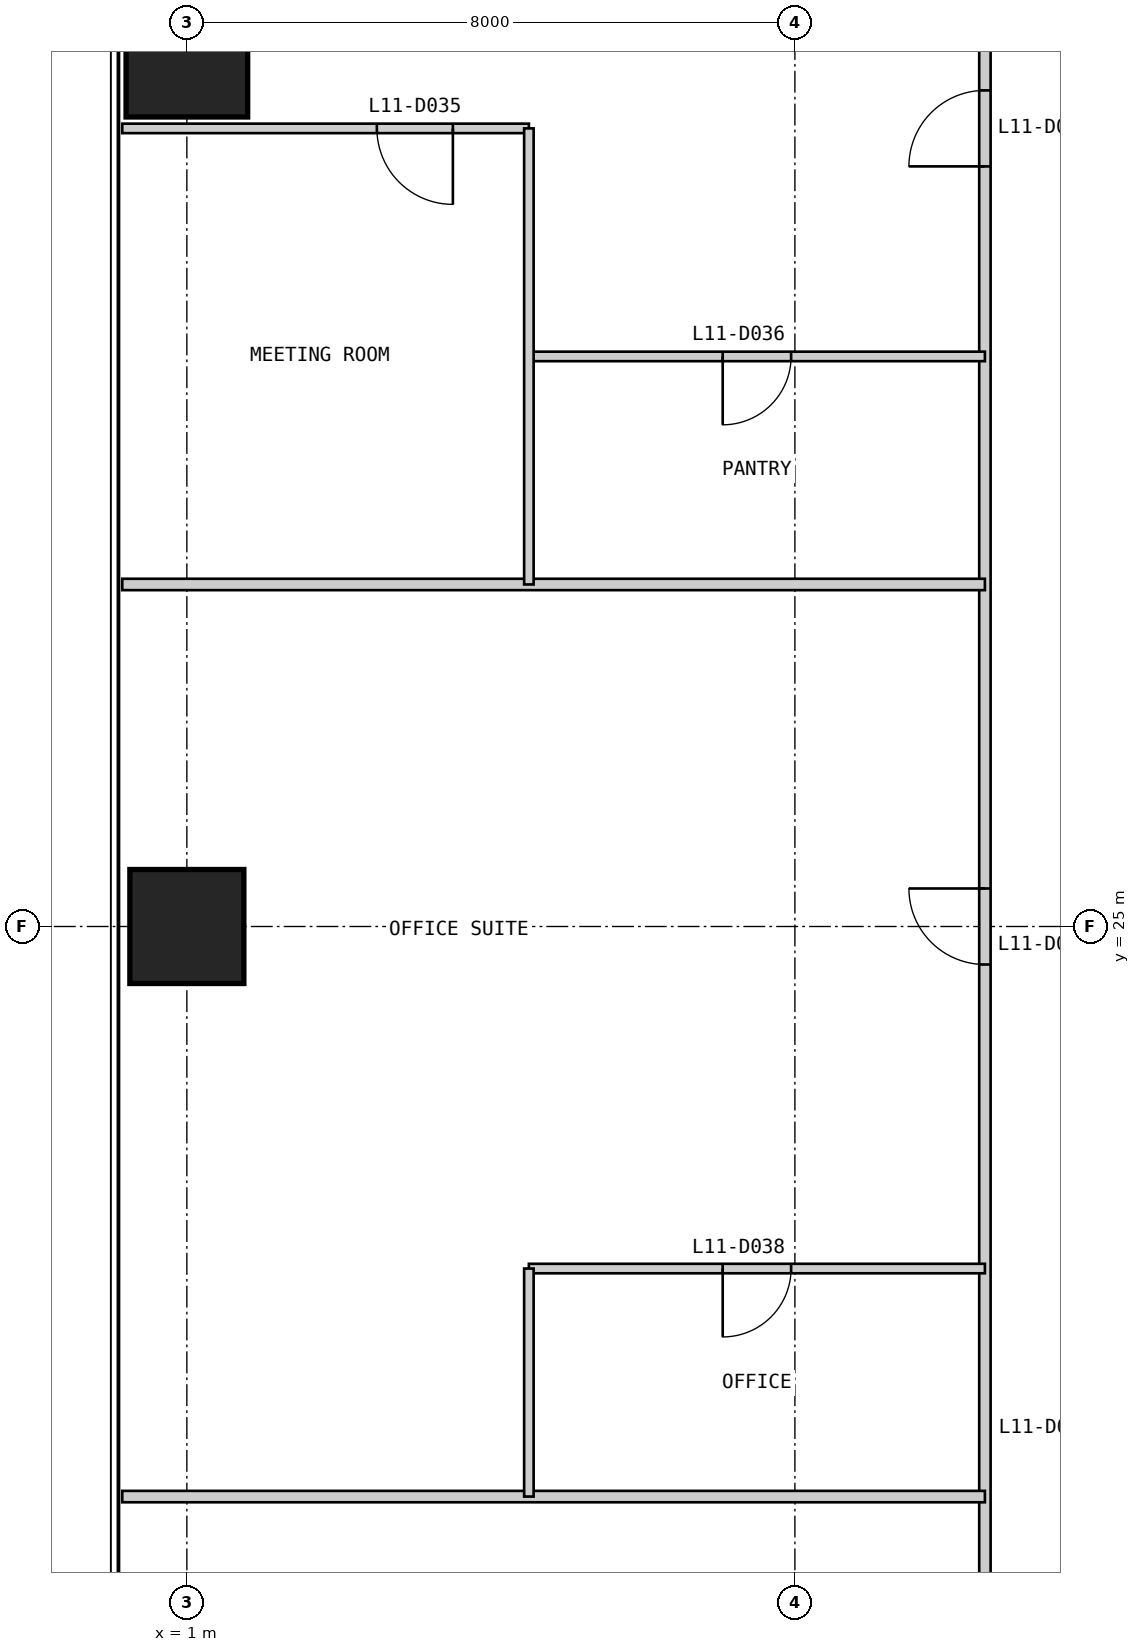
"""IFC4 building model, lengths in metres.
Left out: names, types, materials, properties, quantities, classifications, styles, units other than length and angle.
Written with IfcOpenShell. Run it as: python <this file> out.ifc"""

import sys

from ifc_helpers import new_model, si_unit, direction, frame, frame_2d, origin, origin_2d, place, context, subcontext, project, spatial, rectangle, extrude, element, fill, save


model = new_model("IFC4")
c1 = context("Model", 3, precision=1e-05, world=origin(), true_north=direction((0.0, 1.0)))
c2 = subcontext(c1, "Body", "Model", "MODEL_VIEW")
j1 = project(units=[si_unit("LENGTHUNIT", "METRE"), si_unit("PLANEANGLEUNIT", "RADIAN")], contexts=[c1])
p1 = place(None, origin())
s1 = spatial("IfcSite", under=j1, at=p1, CompositionType="ELEMENT")
p2 = place(p1, origin())
s2 = spatial("IfcBuilding", under=s1, at=p2, CompositionType="ELEMENT")
p3 = place(p2, frame((0.0, 0.0, 51.0)))
s3 = spatial("IfcBuildingStorey", under=s2, at=p3, CompositionType="ELEMENT", Elevation=51.0)
p4 = place(p3, frame((1.0, 37.0, 0.0), z_axis=(0.0, 0.0, 1.0), x_axis=(1.0, 0.0, 0.0)))
e1 = element("IfcColumn", 1, at=p4, inside=s3, PredefinedType="COLUMN", context=c2, shape_type="SweptSolid", body=[
    extrude(rectangle(XDim=1.6, YDim=2.7, at=origin_2d()), origin(), (0.0, 0.0, 1.0), 4.0),
])
p5 = place(p3, frame((1.0, 25.0, 0.0), z_axis=(0.0, 0.0, 1.0), x_axis=(1.0, 0.0, 0.0)))
e2 = element("IfcColumn", 2, at=p5, inside=s3, PredefinedType="COLUMN", context=c2, shape_type="SweptSolid", body=[
    extrude(rectangle(XDim=1.5, YDim=1.5, at=origin_2d()), origin(), (0.0, 0.0, 1.0), 4.0),
])
p6 = place(p3, frame((11.5, 38.5, 0.0), z_axis=(0.0, 0.0, 1.0), x_axis=(0.0, -1.0, 0.0)))
e3 = element("IfcWall", 3, at=p6, inside=s3, PredefinedType="PARTITIONING", context=c2, shape_type="SweptSolid", body=[
    extrude(rectangle(XDim=27.0, YDim=0.15, at=frame_2d((13.5, 0.0))), origin(), (0.0, 0.0, 1.0), 3.85),
])
p7 = place(p6, frame((2.5, 0.0, 0.0)))
e4 = element("IfcOpeningElement", 4, at=p7, cuts=e3, PredefinedType="OPENING", context=c2, shape_type="SweptSolid", body=[
    extrude(rectangle(XDim=1.0, YDim=2.2, at=frame_2d((0.5, 1.1))), frame((0.0, 0.085, 0.0), z_axis=(0.0, -1.0, 0.0), x_axis=(1.0, 0.0, 0.0)), (0.0, 0.0, 1.0), 0.17),
])
p8 = place(p6, frame((13.0, 0.0, 0.0)))
e5 = element("IfcOpeningElement", 5, at=p8, cuts=e3, PredefinedType="OPENING", context=c2, shape_type="SweptSolid", body=[
    extrude(rectangle(XDim=1.0, YDim=2.2, at=frame_2d((0.5, 1.1))), frame((0.0, 0.085, 0.0), z_axis=(0.0, -1.0, 0.0), x_axis=(1.0, 0.0, 0.0)), (0.0, 0.0, 1.0), 0.17),
])
p9 = place(p6, frame((23.5, 0.0, 0.0)))
e6 = element("IfcOpeningElement", 6, at=p9, cuts=e3, PredefinedType="OPENING", context=c2, shape_type="SweptSolid", body=[
    extrude(rectangle(XDim=1.0, YDim=2.2, at=frame_2d((0.5, 1.1))), frame((0.0, 0.085, 0.0), z_axis=(0.0, -1.0, 0.0), x_axis=(1.0, 0.0, 0.0)), (0.0, 0.0, 1.0), 0.17),
])
p10 = place(p3, frame((0.15, 35.5, 0.0), z_axis=(0.0, 0.0, 1.0), x_axis=(1.0, 0.0, 0.0)))
e7 = element("IfcWall", 7, at=p10, inside=s3, PredefinedType="PARTITIONING", context=c2, shape_type="SweptSolid", body=[
    extrude(rectangle(XDim=5.35, YDim=0.125, at=frame_2d((2.675, 0.0))), origin(), (0.0, 0.0, 1.0), 3.85),
])
p11 = place(p10, frame((3.35, 0.0, 0.0)))
e8 = element("IfcOpeningElement", 8, at=p11, cuts=e7, PredefinedType="OPENING", context=c2, shape_type="SweptSolid", body=[
    extrude(rectangle(XDim=1.0, YDim=2.2, at=frame_2d((0.5, 1.1))), frame((0.0, 0.073, 0.0), z_axis=(0.0, -1.0, 0.0), x_axis=(1.0, 0.0, 0.0)), (0.0, 0.0, 1.0), 0.145),
])
p12 = place(p3, frame((5.5, 32.5, 0.0), z_axis=(0.0, 0.0, 1.0), x_axis=(1.0, 0.0, 0.0)))
e9 = element("IfcWall", 9, at=p12, inside=s3, PredefinedType="PARTITIONING", context=c2, shape_type="SweptSolid", body=[
    extrude(rectangle(XDim=6.0, YDim=0.125, at=frame_2d((3.0, 0.0))), origin(), (0.0, 0.0, 1.0), 3.85),
])
p13 = place(p12, frame((2.55, 0.0, 0.0)))
e10 = element("IfcOpeningElement", 10, at=p13, cuts=e9, PredefinedType="OPENING", context=c2, shape_type="SweptSolid", body=[
    extrude(rectangle(XDim=0.9, YDim=2.2, at=frame_2d((0.45, 1.1))), frame((0.0, 0.073, 0.0), z_axis=(0.0, -1.0, 0.0), x_axis=(1.0, 0.0, 0.0)), (0.0, 0.0, 1.0), 0.145),
])
p14 = place(p3, frame((0.15, 29.5, 0.0), z_axis=(0.0, 0.0, 1.0), x_axis=(1.0, 0.0, 0.0)))
e11 = element("IfcWall", 11, at=p14, inside=s3, PredefinedType="PARTITIONING", context=c2, shape_type="SweptSolid", body=[
    extrude(rectangle(XDim=11.35, YDim=0.15, at=frame_2d((5.675, 0.0))), origin(), (0.0, 0.0, 1.0), 3.85),
])
p15 = place(p3, frame((5.5, 20.5, 0.0), z_axis=(0.0, 0.0, 1.0), x_axis=(1.0, 0.0, 0.0)))
e12 = element("IfcWall", 12, at=p15, inside=s3, PredefinedType="PARTITIONING", context=c2, shape_type="SweptSolid", body=[
    extrude(rectangle(XDim=6.0, YDim=0.125, at=frame_2d((3.0, 0.0))), origin(), (0.0, 0.0, 1.0), 3.85),
])
p16 = place(p15, frame((2.55, 0.0, 0.0)))
e13 = element("IfcOpeningElement", 13, at=p16, cuts=e12, PredefinedType="OPENING", context=c2, shape_type="SweptSolid", body=[
    extrude(rectangle(XDim=0.9, YDim=2.2, at=frame_2d((0.45, 1.1))), frame((0.0, 0.073, 0.0), z_axis=(0.0, -1.0, 0.0), x_axis=(1.0, 0.0, 0.0)), (0.0, 0.0, 1.0), 0.145),
])
p17 = place(p3, frame((0.15, 17.5, 0.0), z_axis=(0.0, 0.0, 1.0), x_axis=(1.0, 0.0, 0.0)))
e14 = element("IfcWall", 14, at=p17, inside=s3, PredefinedType="PARTITIONING", context=c2, shape_type="SweptSolid", body=[
    extrude(rectangle(XDim=11.35, YDim=0.15, at=frame_2d((5.675, 0.0))), origin(), (0.0, 0.0, 1.0), 3.85),
])
p18 = place(p3, frame((5.5, 35.5, 0.0), z_axis=(0.0, 0.0, 1.0), x_axis=(0.0, -1.0, 0.0)))
e15 = element("IfcWall", 15, at=p18, inside=s3, PredefinedType="PARTITIONING", context=c2, shape_type="SweptSolid", body=[
    extrude(rectangle(XDim=6.0, YDim=0.125, at=frame_2d((3.0, 0.0))), origin(), (0.0, 0.0, 1.0), 3.85),
])
p19 = place(p3, frame((5.5, 20.5, 0.0), z_axis=(0.0, 0.0, 1.0), x_axis=(0.0, -1.0, 0.0)))
e16 = element("IfcWall", 16, at=p19, inside=s3, PredefinedType="PARTITIONING", context=c2, shape_type="SweptSolid", body=[
    extrude(rectangle(XDim=3.0, YDim=0.125, at=frame_2d((1.5, 0.0))), origin(), (0.0, 0.0, 1.0), 3.85),
])
p20 = place(p7, frame((1.0, 0.0, 0.0), z_axis=(0.0, 0.0, 1.0), x_axis=(-1.0, 0.0, 0.0)))
e17 = element("IfcDoor", 17, at=p20, inside=s3, OperationType="SINGLE_SWING_LEFT", PredefinedType="DOOR", context=c2, shape_type="SweptSolid", body=[
    extrude(rectangle(XDim=1.0, YDim=2.2, at=frame_2d((0.5, 1.1))), frame((0.0, 0.025, 0.0), z_axis=(0.0, -1.0, 0.0), x_axis=(1.0, 0.0, 0.0)), (0.0, 0.0, 1.0), 0.05),
])
fill(e4, e17)
p21 = place(p11, frame((1.0, 0.0, 0.0), z_axis=(0.0, 0.0, 1.0), x_axis=(-1.0, 0.0, 0.0)))
e18 = element("IfcDoor", 18, at=p21, inside=s3, OperationType="SINGLE_SWING_LEFT", PredefinedType="DOOR", context=c2, shape_type="SweptSolid", body=[
    extrude(rectangle(XDim=1.0, YDim=2.2, at=frame_2d((0.5, 1.1))), frame((0.0, 0.025, 0.0), z_axis=(0.0, -1.0, 0.0), x_axis=(1.0, 0.0, 0.0)), (0.0, 0.0, 1.0), 0.05),
])
fill(e8, e18)
p22 = place(p13, frame((0.9, 0.0, 0.0), z_axis=(0.0, 0.0, 1.0), x_axis=(-1.0, 0.0, 0.0)))
e19 = element("IfcDoor", 19, at=p22, inside=s3, OperationType="SINGLE_SWING_RIGHT", PredefinedType="DOOR", context=c2, shape_type="SweptSolid", body=[
    extrude(rectangle(XDim=0.9, YDim=2.2, at=frame_2d((0.45, 1.1))), frame((0.0, 0.025, 0.0), z_axis=(0.0, -1.0, 0.0), x_axis=(1.0, 0.0, 0.0)), (0.0, 0.0, 1.0), 0.05),
])
fill(e10, e19)
p23 = place(p8, frame((1.0, 0.0, 0.0), z_axis=(0.0, 0.0, 1.0), x_axis=(-1.0, 0.0, 0.0)))
e20 = element("IfcDoor", 20, at=p23, inside=s3, OperationType="SINGLE_SWING_RIGHT", PredefinedType="DOOR", context=c2, shape_type="SweptSolid", body=[
    extrude(rectangle(XDim=1.0, YDim=2.2, at=frame_2d((0.5, 1.1))), frame((0.0, 0.025, 0.0), z_axis=(0.0, -1.0, 0.0), x_axis=(1.0, 0.0, 0.0)), (0.0, 0.0, 1.0), 0.05),
])
fill(e5, e20)
p24 = place(p16, frame((0.9, 0.0, 0.0), z_axis=(0.0, 0.0, 1.0), x_axis=(-1.0, 0.0, 0.0)))
e21 = element("IfcDoor", 21, at=p24, inside=s3, OperationType="SINGLE_SWING_RIGHT", PredefinedType="DOOR", context=c2, shape_type="SweptSolid", body=[
    extrude(rectangle(XDim=0.9, YDim=2.2, at=frame_2d((0.45, 1.1))), frame((0.0, 0.025, 0.0), z_axis=(0.0, -1.0, 0.0), x_axis=(1.0, 0.0, 0.0)), (0.0, 0.0, 1.0), 0.05),
])
fill(e13, e21)
save(model, sys.argv[1])
